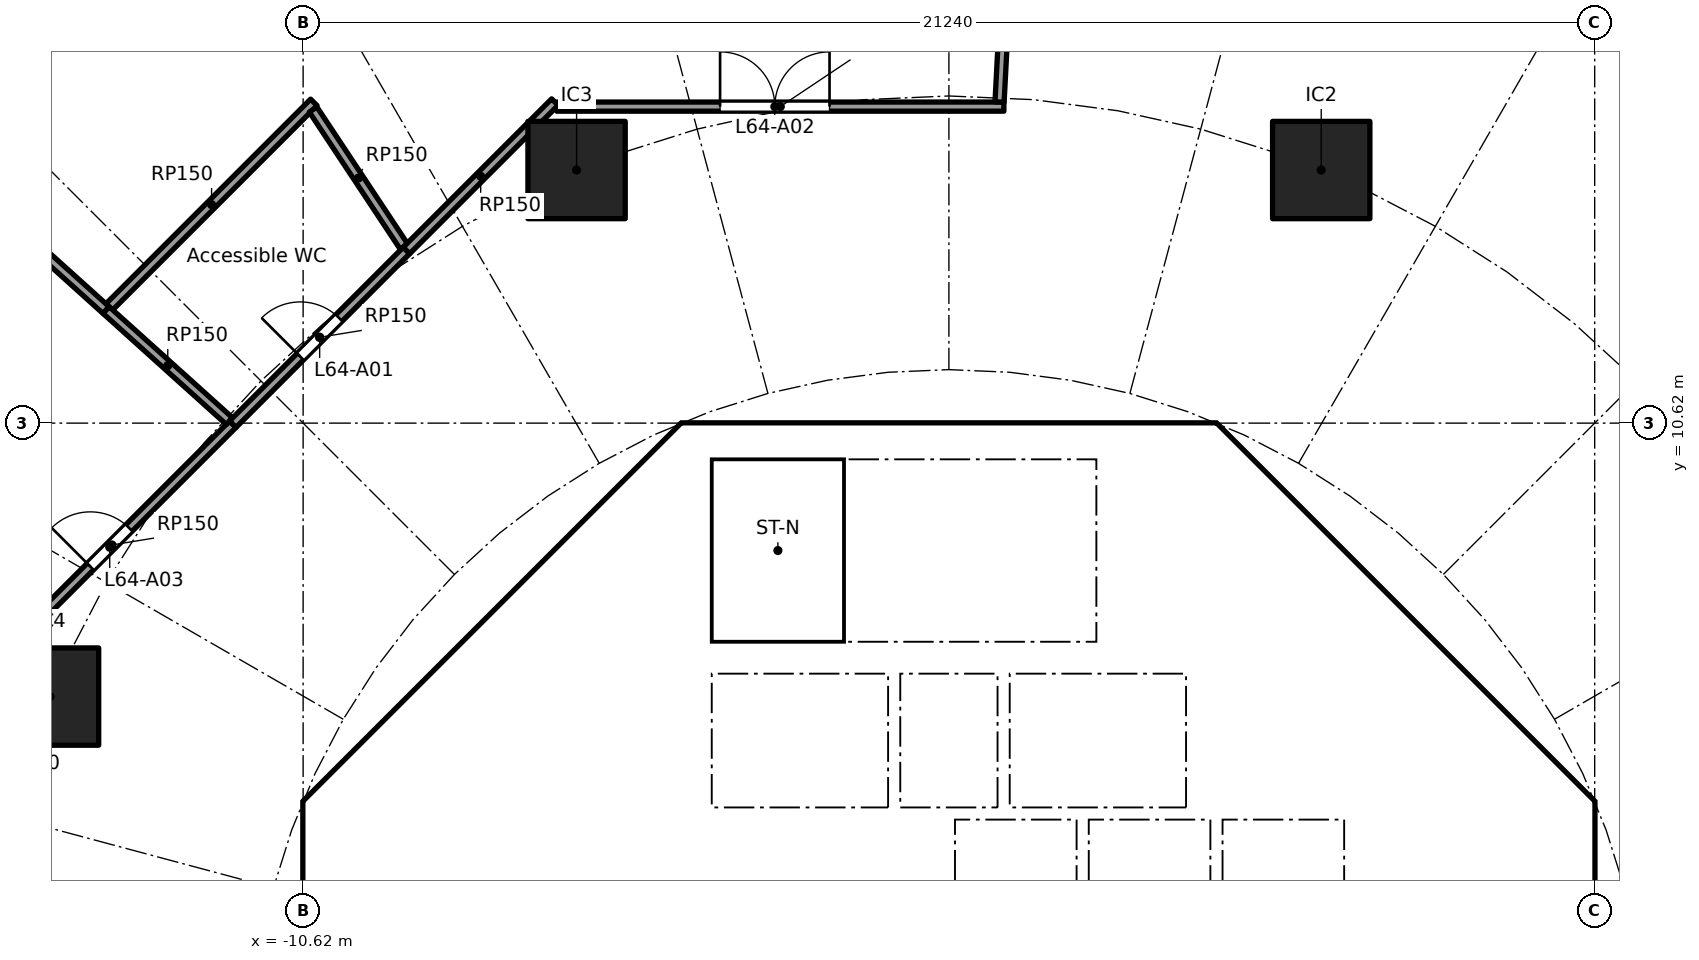
"""IFC4 building model, lengths in metres.
Left out: names, types, materials, properties, quantities, classifications, styles, units other than length and angle.
Written with IfcOpenShell. Run it as: python <this file> out.ifc"""

import sys

from ifc_helpers import new_model, si_unit, direction, frame, frame_2d, origin, origin_2d, place, context, subcontext, project, spatial, polyline, rectangle, outline, extrude, element, fill, save


model = new_model("IFC4")
c1 = context("Model", 3, precision=1e-05, world=origin(), true_north=direction((0.0, 1.0)))
c2 = subcontext(c1, "Body", "Model", "MODEL_VIEW")
j1 = project(units=[si_unit("LENGTHUNIT", "METRE"), si_unit("PLANEANGLEUNIT", "RADIAN")], contexts=[c1])
p1 = place(None, origin())
s1 = spatial("IfcSite", under=j1, at=p1, CompositionType="ELEMENT")
p2 = place(p1, origin())
s2 = spatial("IfcBuilding", under=s1, at=p2, CompositionType="ELEMENT")
p3 = place(p2, frame((0.0, 0.0, 252.9)))
s3 = spatial("IfcBuildingStorey", under=s2, at=p3, CompositionType="ELEMENT", Elevation=252.9)
for number, where, z_axis, x_axis in (
    (1, (6.123, 14.782, 0.0), (0.0, 0.0, 1.0), (1.0, 0.0, 0.0)),
    (2, (-6.123, 14.782, 0.0), (0.0, 0.0, 1.0), (1.0, 0.0, 0.0)),
    (3, (-14.782, 6.123, 0.0), (0.0, 0.0, 1.0), (1.0, 0.0, 0.0)),
):
    element("IfcColumn", number, at=place(p3, frame(where, z_axis=z_axis, x_axis=x_axis)), inside=s3, PredefinedType="COLUMN", context=c2, shape_type="SweptSolid", body=[
        extrude(rectangle(XDim=1.6, YDim=1.6, at=origin_2d()), origin(), (0.0, 0.0, 1.0), 5.6),
    ])
p4 = place(p3, frame((9.988, 4.613, 0.0), z_axis=(0.0, 0.0, 1.0), x_axis=(-0.707106781187, 0.707106781187, 0.0)))
e4 = element("IfcWall", 4, at=p4, inside=s3, PredefinedType="SHEAR", context=c2, shape_type="SweptSolid", body=[
    extrude(rectangle(XDim=7.602, YDim=0.6, at=frame_2d((3.801, 0.0))), origin(), (0.0, 0.0, 1.0), 5.34),
])
p5 = place(p4, frame((3.201, 0.0, 0.0)))
e5 = element("IfcOpeningElement", 5, at=p5, cuts=e4, PredefinedType="OPENING", context=c2, shape_type="SweptSolid", body=[
    extrude(rectangle(XDim=1.2, YDim=2.1, at=frame_2d((0.6, 1.05))), frame((0.0, 0.31, 0.0), z_axis=(0.0, -1.0, 0.0), x_axis=(1.0, 0.0, 0.0)), (0.0, 0.0, 1.0), 0.62),
])
p6 = place(p3, frame((-4.613, 9.988, 0.0), z_axis=(0.0, 0.0, 1.0), x_axis=(-0.707106781187, -0.707106781187, 0.0)))
e6 = element("IfcWall", 6, at=p6, inside=s3, PredefinedType="SHEAR", context=c2, shape_type="SweptSolid", body=[
    extrude(rectangle(XDim=7.602, YDim=0.6, at=frame_2d((3.801, 0.0))), origin(), (0.0, 0.0, 1.0), 5.34),
])
p7 = place(p6, frame((0.351, 0.0, 0.0)))
e7 = element("IfcOpeningElement", 7, at=p7, cuts=e6, PredefinedType="OPENING", context=c2, shape_type="SweptSolid", body=[
    extrude(rectangle(XDim=1.1, YDim=2.1, at=frame_2d((0.55, 1.05))), frame((0.0, 0.31, 0.0), z_axis=(0.0, -1.0, 0.0), x_axis=(1.0, 0.0, 0.0)), (0.0, 0.0, 1.0), 0.62),
])
p8 = place(p3, frame((-10.325, 3.801, 0.0), z_axis=(0.0, 0.0, 1.0), x_axis=(0.0, -1.0, 0.0)))
e8 = element("IfcWall", 8, at=p8, inside=s3, PredefinedType="SHEAR", context=c2, shape_type="SweptSolid", body=[
    extrude(rectangle(XDim=7.602, YDim=0.6, at=frame_2d((3.801, 0.0))), origin(), (0.0, 0.0, 1.0), 5.34),
])
p9 = place(p8, frame((0.651, 0.0, 0.0)))
e9 = element("IfcOpeningElement", 9, at=p9, cuts=e8, PredefinedType="OPENING", context=c2, shape_type="SweptSolid", body=[
    extrude(rectangle(XDim=1.5, YDim=2.1, at=frame_2d((0.75, 1.05))), frame((0.0, 0.31, 0.0), z_axis=(0.0, -1.0, 0.0), x_axis=(1.0, 0.0, 0.0)), (0.0, 0.0, 1.0), 0.62),
])
p10 = place(p8, frame((5.451, 0.0, 0.0)))
e10 = element("IfcOpeningElement", 10, at=p10, cuts=e8, PredefinedType="OPENING", context=c2, shape_type="SweptSolid", body=[
    extrude(rectangle(XDim=1.5, YDim=2.1, at=frame_2d((0.75, 1.05))), frame((0.0, 0.31, 0.0), z_axis=(0.0, -1.0, 0.0), x_axis=(1.0, 0.0, 0.0)), (0.0, 0.0, 1.0), 0.62),
])
p11 = place(p3, frame((-5.8, 4.3, 0.0), z_axis=(0.0, 0.0, 1.0), x_axis=(0.0, 1.0, 0.0)))
e11 = element("IfcWall", 11, at=p11, inside=s3, PredefinedType="PARTITIONING", context=c2, shape_type="SweptSolid", body=[
    extrude(rectangle(XDim=3.927, YDim=0.15, at=frame_2d((1.963, 0.0))), origin(), (0.0, 0.0, 1.0), 5.34),
])
p12 = place(p11, frame((1.551, 0.0, 0.0)))
e12 = element("IfcOpeningElement", 12, at=p12, cuts=e11, PredefinedType="OPENING", context=c2, shape_type="SweptSolid", body=[
    extrude(rectangle(XDim=0.9, YDim=2.1, at=frame_2d((0.45, 1.05))), frame((0.0, 0.085, 0.0), z_axis=(0.0, -1.0, 0.0), x_axis=(1.0, 0.0, 0.0)), (0.0, 0.0, 1.0), 0.17),
])
p13 = place(p3, frame((4.0, 4.3, 0.0), z_axis=(0.0, 0.0, 1.0), x_axis=(0.0, 1.0, 0.0)))
e13 = element("IfcWall", 13, at=p13, inside=s3, PredefinedType="SOLIDWALL", context=c2, shape_type="SweptSolid", body=[
    extrude(rectangle(XDim=2.2, YDim=0.2, at=frame_2d((1.1, 0.0))), origin(), (0.0, 0.0, 1.0), 5.34),
])
p14 = place(p13, frame((0.55, 0.0, 0.0)))
e14 = element("IfcOpeningElement", 14, at=p14, cuts=e13, PredefinedType="OPENING", context=c2, shape_type="SweptSolid", body=[
    extrude(rectangle(XDim=1.1, YDim=2.1, at=frame_2d((0.55, 1.05))), frame((0.0, 0.11, 0.0), z_axis=(0.0, -1.0, 0.0), x_axis=(1.0, 0.0, 0.0)), (0.0, 0.0, 1.0), 0.22),
])
p15 = place(p3, frame((-4.0, 4.3, 0.0), z_axis=(0.0, 0.0, 1.0), x_axis=(0.0, 1.0, 0.0)))
e15 = element("IfcWall", 15, at=p15, inside=s3, PredefinedType="SOLIDWALL", context=c2, shape_type="SweptSolid", body=[
    extrude(rectangle(XDim=2.2, YDim=0.2, at=frame_2d((1.1, 0.0))), origin(), (0.0, 0.0, 1.0), 5.34),
])
p16 = place(p15, frame((0.55, 0.0, 0.0)))
e16 = element("IfcOpeningElement", 16, at=p16, cuts=e15, PredefinedType="OPENING", context=c2, shape_type="SweptSolid", body=[
    extrude(rectangle(XDim=1.1, YDim=2.1, at=frame_2d((0.55, 1.05))), frame((0.0, 0.11, 0.0), z_axis=(0.0, -1.0, 0.0), x_axis=(1.0, 0.0, 0.0)), (0.0, 0.0, 1.0), 0.22),
])
p17 = place(p3, frame((6.7, 4.0, 0.0), z_axis=(0.0, 0.0, 1.0), x_axis=(1.0, 0.0, 0.0)))
e17 = element("IfcWall", 17, at=p17, inside=s3, PredefinedType="SOLIDWALL", context=c2, shape_type="SweptSolid", body=[
    extrude(rectangle(XDim=3.325, YDim=0.2, at=frame_2d((1.662, 0.0))), origin(), (0.0, 0.0, 1.0), 5.34),
])
p18 = place(p17, frame((1.25, 0.0, 0.0)))
e18 = element("IfcOpeningElement", 18, at=p18, cuts=e17, PredefinedType="OPENING", context=c2, shape_type="SweptSolid", body=[
    extrude(rectangle(XDim=1.1, YDim=2.1, at=frame_2d((0.55, 1.05))), frame((0.0, 0.11, 0.0), z_axis=(0.0, -1.0, 0.0), x_axis=(1.0, 0.0, 0.0)), (0.0, 0.0, 1.0), 0.22),
])
p19 = place(p3, frame((4.0, 7.025, 0.0), z_axis=(0.0, 0.0, 1.0), x_axis=(0.0, 1.0, 0.0)))
e19 = element("IfcWall", 19, at=p19, inside=s3, PredefinedType="SOLIDWALL", context=c2, shape_type="SweptSolid", body=[
    extrude(rectangle(XDim=3.0, YDim=0.2, at=frame_2d((1.5, 0.0))), origin(), (0.0, 0.0, 1.0), 5.34),
])
p20 = place(p19, frame((0.925, 0.0, 0.0)))
e20 = element("IfcOpeningElement", 20, at=p20, cuts=e19, PredefinedType="OPENING", context=c2, shape_type="SweptSolid", body=[
    extrude(rectangle(XDim=1.1, YDim=2.1, at=frame_2d((0.55, 1.05))), frame((0.0, 0.11, 0.0), z_axis=(0.0, -1.0, 0.0), x_axis=(1.0, 0.0, 0.0)), (0.0, 0.0, 1.0), 0.22),
])
p21 = place(p3, origin())
e21 = element("IfcWall", 21, at=p21, inside=s3, PredefinedType="SHEAR", context=c2, shape_type="SweptSolid", body=[
    extrude(outline(polyline([(-10.2, 4.825), (-9.776, 4.401), (-10.025, 4.152), (-10.025, 3.801), (-10.625, 3.801), (-10.625, 4.401), (-10.2, 4.825)])), origin(), (0.0, 0.0, 1.0), 5.34),
])
p22 = place(p3, origin())
e22 = element("IfcWall", 22, at=p22, inside=s3, PredefinedType="SHEAR", context=c2, shape_type="SweptSolid", body=[
    extrude(outline(polyline([(-4.152, 10.025), (-4.401, 9.776), (-4.825, 10.2), (-4.401, 10.625), (4.401, 10.625), (4.825, 10.2), (4.401, 9.776), (4.152, 10.025), (-4.152, 10.025)])), origin(), (0.0, 0.0, 1.0), 5.34),
])
p23 = place(p3, origin())
e23 = element("IfcWall", 23, at=p23, inside=s3, PredefinedType="SHEAR", context=c2, shape_type="SweptSolid", body=[
    extrude(outline(polyline([(9.776, -4.401), (10.025, -4.152), (10.025, -3.801), (10.025, 4.152), (9.776, 4.401), (10.2, 4.825), (10.625, 4.401), (10.625, -4.401), (10.2, -4.825), (9.776, -4.401)])), origin(), (0.0, 0.0, 1.0), 5.34),
])
for number, where, z_axis, x_axis in (
    (24, (-0.9, 4.3, 0.0), (0.0, 0.0, 1.0), (0.0, 1.0, 0.0)),
    (25, (0.9, 4.3, 0.0), (0.0, 0.0, 1.0), (0.0, 1.0, 0.0)),
):
    element("IfcWall", number, at=place(p3, frame(where, z_axis=z_axis, x_axis=x_axis)), inside=s3, PredefinedType="SOLIDWALL", context=c2, shape_type="SweptSolid", body=[
        extrude(rectangle(XDim=2.2, YDim=0.2, at=frame_2d((1.1, 0.0))), origin(), (0.0, 0.0, 1.0), 5.34),
    ])
p24 = place(p3, origin())
e26 = element("IfcWall", 26, at=p24, inside=s3, PredefinedType="SOLIDWALL", context=c2, shape_type="SweptSolid", body=[
    extrude(outline(polyline([(-6.7, 4.3), (6.7, 4.3), (6.7, 2.1), (6.5, 2.1), (6.5, 4.1), (4.5, 4.1), (4.5, 2.1), (4.3, 2.1), (4.3, 4.1), (2.3, 4.1), (2.3, 2.1), (2.1, 2.1), (2.1, 4.1), (0.1, 4.1), (0.1, 2.1), (-0.1, 2.1), (-0.1, 4.1), (-6.5, 4.1), (-6.5, 2.1), (-6.7, 2.1), (-6.7, 4.3)])), origin(), (0.0, 0.0, 1.0), 5.34),
])
p25 = place(p3, frame((-10.025, 4.0, 0.0), z_axis=(0.0, 0.0, 1.0), x_axis=(1.0, 0.0, 0.0)))
e27 = element("IfcWall", 27, at=p25, inside=s3, PredefinedType="PARTITIONING", context=c2, shape_type="SweptSolid", body=[
    extrude(rectangle(XDim=3.325, YDim=0.2, at=frame_2d((1.662, 0.0))), origin(), (0.0, 0.0, 1.0), 5.34),
])
p26 = place(p3, origin())
e28 = element("IfcWall", 28, at=p26, inside=s3, PredefinedType="SOLIDWALL", context=c2, shape_type="SweptSolid", body=[
    extrude(outline(polyline([(-3.9, 7.025), (-4.1, 7.025), (-4.1, 10.025), (-3.9, 10.025), (-3.9, 7.025)])), origin(), (0.0, 0.0, 1.0), 5.34),
])
p27 = place(p3, origin())
e29 = element("IfcWall", 29, at=p27, inside=s3, PredefinedType="SOLIDWALL", context=c2, shape_type="SweptSolid", body=[
    extrude(outline(polyline([(4.1, 6.5), (-4.1, 6.5), (-4.1, 7.025), (4.1, 7.025), (4.1, 6.5)])), origin(), (0.0, 0.0, 1.0), 5.34),
])
p28 = place(p3, origin())
e30 = element("IfcWall", 30, at=p28, inside=s3, PredefinedType="SOLIDWALL", context=c2, shape_type="SweptSolid", body=[
    extrude(outline(polyline([(7.025, -3.9), (6.7, -3.9), (6.7, 3.9), (7.025, 3.9), (7.025, -3.9)])), origin(), (0.0, 0.0, 1.0), 5.34),
])
p29 = place(p3, frame((-15.75, 6.63, 0.0), z_axis=(0.0, 0.0, 1.0), x_axis=(0.707193665351, 0.707019886345, 0.0)))
e31 = element("IfcWall", 31, at=p29, inside=s3, PredefinedType="PARTITIONING", context=c2, shape_type="SweptSolid", body=[
    extrude(rectangle(XDim=5.62, YDim=0.15, at=frame_2d((2.81, 0.0))), origin(), (0.0, 0.0, 1.0), 5.34),
])
p30 = place(p29, frame((2.307, 0.0, 0.0)))
e32 = element("IfcOpeningElement", 32, at=p30, cuts=e31, PredefinedType="OPENING", context=c2, shape_type="SweptSolid", body=[
    extrude(rectangle(XDim=0.9, YDim=2.1, at=frame_2d((0.45, 1.05))), frame((0.0, 0.085, 0.0), z_axis=(0.0, -1.0, 0.0), x_axis=(1.0, 0.0, 0.0)), (0.0, 0.0, 1.0), 0.17),
])
p31 = place(p3, frame((-13.86, 12.479, 0.0), z_axis=(0.0, 0.0, 1.0), x_axis=(-0.743139166891, 0.669136890803, 0.0)))
e33 = element("IfcWall", 33, at=p31, inside=s3, PredefinedType="PARTITIONING", context=c2, shape_type="SweptSolid", body=[
    extrude(rectangle(XDim=9.871, YDim=0.15, at=frame_2d((4.936, 0.0))), origin(), (0.0, 0.0, 1.0), 5.34),
])
p32 = place(p3, frame((-13.807, 12.532, 0.0), z_axis=(0.0, 0.0, 1.0), x_axis=(0.70713244796, 0.707081113481, 0.0)))
e34 = element("IfcWall", 34, at=p32, inside=s3, PredefinedType="PARTITIONING", context=c2, shape_type="SweptSolid", body=[
    extrude(rectangle(XDim=4.756, YDim=0.15, at=frame_2d((2.378, 0.0))), origin(), (0.0, 0.0, 1.0), 5.34),
])
p33 = place(p3, frame((-11.832, 10.653, 0.0), z_axis=(0.0, 0.0, 1.0), x_axis=(-0.743258557706, 0.669004272331, 0.0)))
e35 = element("IfcWall", 35, at=p33, inside=s3, PredefinedType="PARTITIONING", context=c2, shape_type="SweptSolid", body=[
    extrude(rectangle(XDim=2.729, YDim=0.15, at=frame_2d((1.365, 0.0))), origin(), (0.0, 0.0, 1.0), 5.34),
])
p34 = place(p3, frame((-11.776, 10.603, 0.0), z_axis=(0.0, 0.0, 1.0), x_axis=(0.706985897903, 0.707227643808, 0.0)))
e36 = element("IfcWall", 36, at=p34, inside=s3, PredefinedType="PARTITIONING", context=c2, shape_type="SweptSolid", body=[
    extrude(rectangle(XDim=4.04, YDim=0.15, at=frame_2d((2.02, 0.0))), origin(), (0.0, 0.0, 1.0), 5.34),
])
p35 = place(p34, frame((1.57, 0.0, 0.0)))
e37 = element("IfcOpeningElement", 37, at=p35, cuts=e36, PredefinedType="OPENING", context=c2, shape_type="SweptSolid", body=[
    extrude(rectangle(XDim=0.9, YDim=2.1, at=frame_2d((0.45, 1.05))), frame((0.0, 0.085, 0.0), z_axis=(0.0, -1.0, 0.0), x_axis=(1.0, 0.0, 0.0)), (0.0, 0.0, 1.0), 0.17),
])
p36 = place(p3, frame((-10.456, 15.777, 0.0), z_axis=(0.0, 0.0, 1.0), x_axis=(0.552489229136, -0.833520036765, 0.0)))
e38 = element("IfcWall", 38, at=p36, inside=s3, PredefinedType="PARTITIONING", context=c2, shape_type="SweptSolid", body=[
    extrude(rectangle(XDim=2.704, YDim=0.15, at=frame_2d((1.352, 0.0))), origin(), (0.0, 0.0, 1.0), 5.34),
])
p37 = place(p3, frame((-8.92, 13.46, 0.0), z_axis=(0.0, 0.0, 1.0), x_axis=(0.707106781187, 0.707106781187, 0.0)))
e39 = element("IfcWall", 39, at=p37, inside=s3, PredefinedType="PARTITIONING", context=c2, shape_type="SweptSolid", body=[
    extrude(rectangle(XDim=3.451, YDim=0.15, at=frame_2d((1.725, 0.0))), origin(), (0.0, 0.0, 1.0), 5.34),
])
p38 = place(p3, frame((-6.449, 15.825, 0.0), z_axis=(0.0, 0.0, 1.0), x_axis=(1.0, 0.0, 0.0)))
e40 = element("IfcWall", 40, at=p38, inside=s3, PredefinedType="PARTITIONING", context=c2, shape_type="SweptSolid", body=[
    extrude(rectangle(XDim=7.353, YDim=0.15, at=frame_2d((3.677, 0.0))), origin(), (0.0, 0.0, 1.0), 5.34),
])
p39 = place(p38, frame((2.686, 0.0, 0.0)))
e41 = element("IfcOpeningElement", 41, at=p39, cuts=e40, PredefinedType="OPENING", context=c2, shape_type="SweptSolid", body=[
    extrude(rectangle(XDim=1.8, YDim=2.1, at=frame_2d((0.9, 1.05))), frame((0.0, 0.085, 0.0), z_axis=(0.0, -1.0, 0.0), x_axis=(1.0, 0.0, 0.0)), (0.0, 0.0, 1.0), 0.17),
])
p40 = place(p3, frame((0.833, 15.9, 0.0), z_axis=(0.0, 0.0, 1.0), x_axis=(0.052336520132, 0.998629505202, 0.0)))
e42 = element("IfcWall", 42, at=p40, inside=s3, PredefinedType="PARTITIONING", context=c2, shape_type="SweptSolid", body=[
    extrude(rectangle(XDim=14.237, YDim=0.15, at=frame_2d((7.119, 0.0))), origin(), (0.0, 0.0, 1.0), 5.34),
])
p41 = place(p14, origin())
e43 = element("IfcDoor", 43, at=p41, inside=s3, OperationType="DOUBLE_DOOR_SLIDING", PredefinedType="DOOR", context=c2, shape_type="SweptSolid", body=[
    extrude(rectangle(XDim=1.1, YDim=2.1, at=frame_2d((0.55, 1.05))), frame((0.0, 0.025, 0.0), z_axis=(0.0, -1.0, 0.0), x_axis=(1.0, 0.0, 0.0)), (0.0, 0.0, 1.0), 0.05),
])
fill(e14, e43)
p42 = place(p16, origin())
e44 = element("IfcDoor", 44, at=p42, inside=s3, OperationType="DOUBLE_DOOR_SLIDING", PredefinedType="DOOR", context=c2, shape_type="SweptSolid", body=[
    extrude(rectangle(XDim=1.1, YDim=2.1, at=frame_2d((0.55, 1.05))), frame((0.0, 0.025, 0.0), z_axis=(0.0, -1.0, 0.0), x_axis=(1.0, 0.0, 0.0)), (0.0, 0.0, 1.0), 0.05),
])
fill(e16, e44)
p43 = place(p18, frame((1.1, 0.0, 0.0), x_axis=(-1.0, 0.0, 0.0)))
e45 = element("IfcDoor", 45, at=p43, inside=s3, OperationType="SINGLE_SWING_RIGHT", PredefinedType="DOOR", context=c2, shape_type="SweptSolid", body=[
    extrude(rectangle(XDim=1.1, YDim=2.1, at=frame_2d((0.55, 1.05))), frame((0.0, 0.025, 0.0), z_axis=(0.0, -1.0, 0.0), x_axis=(1.0, 0.0, 0.0)), (0.0, 0.0, 1.0), 0.05),
])
fill(e18, e45)
p44 = place(p20, origin())
e46 = element("IfcDoor", 46, at=p44, inside=s3, OperationType="SINGLE_SWING_LEFT", PredefinedType="DOOR", context=c2, shape_type="SweptSolid", body=[
    extrude(rectangle(XDim=1.1, YDim=2.1, at=frame_2d((0.55, 1.05))), frame((0.0, 0.025, 0.0), z_axis=(0.0, -1.0, 0.0), x_axis=(1.0, 0.0, 0.0)), (0.0, 0.0, 1.0), 0.05),
])
fill(e20, e46)
p45 = place(p12, origin())
e47 = element("IfcDoor", 47, at=p45, inside=s3, OperationType="SINGLE_SWING_RIGHT", PredefinedType="DOOR", context=c2, shape_type="SweptSolid", body=[
    extrude(rectangle(XDim=0.9, YDim=2.1, at=frame_2d((0.45, 1.05))), frame((0.0, 0.025, 0.0), z_axis=(0.0, -1.0, 0.0), x_axis=(1.0, 0.0, 0.0)), (0.0, 0.0, 1.0), 0.05),
])
fill(e12, e47)
p46 = place(p5, origin())
e48 = element("IfcDoor", 48, at=p46, inside=s3, OperationType="SINGLE_SWING_LEFT", PredefinedType="DOOR", context=c2, shape_type="SweptSolid", body=[
    extrude(rectangle(XDim=1.2, YDim=2.1, at=frame_2d((0.6, 1.05))), frame((0.0, 0.025, 0.0), z_axis=(0.0, -1.0, 0.0), x_axis=(1.0, 0.0, 0.0)), (0.0, 0.0, 1.0), 0.05),
])
fill(e5, e48)
p47 = place(p9, origin())
e49 = element("IfcDoor", 49, at=p47, inside=s3, OperationType="DOUBLE_DOOR_SINGLE_SWING", PredefinedType="DOOR", context=c2, shape_type="SweptSolid", body=[
    extrude(rectangle(XDim=1.5, YDim=2.1, at=frame_2d((0.75, 1.05))), frame((0.0, 0.025, 0.0), z_axis=(0.0, -1.0, 0.0), x_axis=(1.0, 0.0, 0.0)), (0.0, 0.0, 1.0), 0.05),
])
fill(e9, e49)
p48 = place(p7, origin())
e50 = element("IfcDoor", 50, at=p48, inside=s3, OperationType="SINGLE_SWING_LEFT", PredefinedType="DOOR", context=c2, shape_type="SweptSolid", body=[
    extrude(rectangle(XDim=1.1, YDim=2.1, at=frame_2d((0.55, 1.05))), frame((0.0, 0.025, 0.0), z_axis=(0.0, -1.0, 0.0), x_axis=(1.0, 0.0, 0.0)), (0.0, 0.0, 1.0), 0.05),
])
fill(e7, e50)
p49 = place(p35, origin())
e51 = element("IfcDoor", 51, at=p49, inside=s3, OperationType="SINGLE_SWING_LEFT", PredefinedType="DOOR", context=c2, shape_type="SweptSolid", body=[
    extrude(rectangle(XDim=0.9, YDim=2.1, at=frame_2d((0.45, 1.05))), frame((0.0, 0.025, 0.0), z_axis=(0.0, -1.0, 0.0), x_axis=(1.0, 0.0, 0.0)), (0.0, 0.0, 1.0), 0.05),
])
fill(e37, e51)
p50 = place(p39, origin())
e52 = element("IfcDoor", 52, at=p50, inside=s3, OperationType="DOUBLE_DOOR_SINGLE_SWING", PredefinedType="DOOR", context=c2, shape_type="SweptSolid", body=[
    extrude(rectangle(XDim=1.8, YDim=2.1, at=frame_2d((0.9, 1.05))), frame((0.0, 0.025, 0.0), z_axis=(0.0, -1.0, 0.0), x_axis=(1.0, 0.0, 0.0)), (0.0, 0.0, 1.0), 0.05),
])
fill(e41, e52)
p51 = place(p30, origin())
e53 = element("IfcDoor", 53, at=p51, inside=s3, OperationType="SINGLE_SWING_LEFT", PredefinedType="DOOR", context=c2, shape_type="SweptSolid", body=[
    extrude(rectangle(XDim=0.9, YDim=2.1, at=frame_2d((0.45, 1.05))), frame((0.0, 0.025, 0.0), z_axis=(0.0, -1.0, 0.0), x_axis=(1.0, 0.0, 0.0)), (0.0, 0.0, 1.0), 0.05),
])
fill(e32, e53)
save(model, sys.argv[1])
